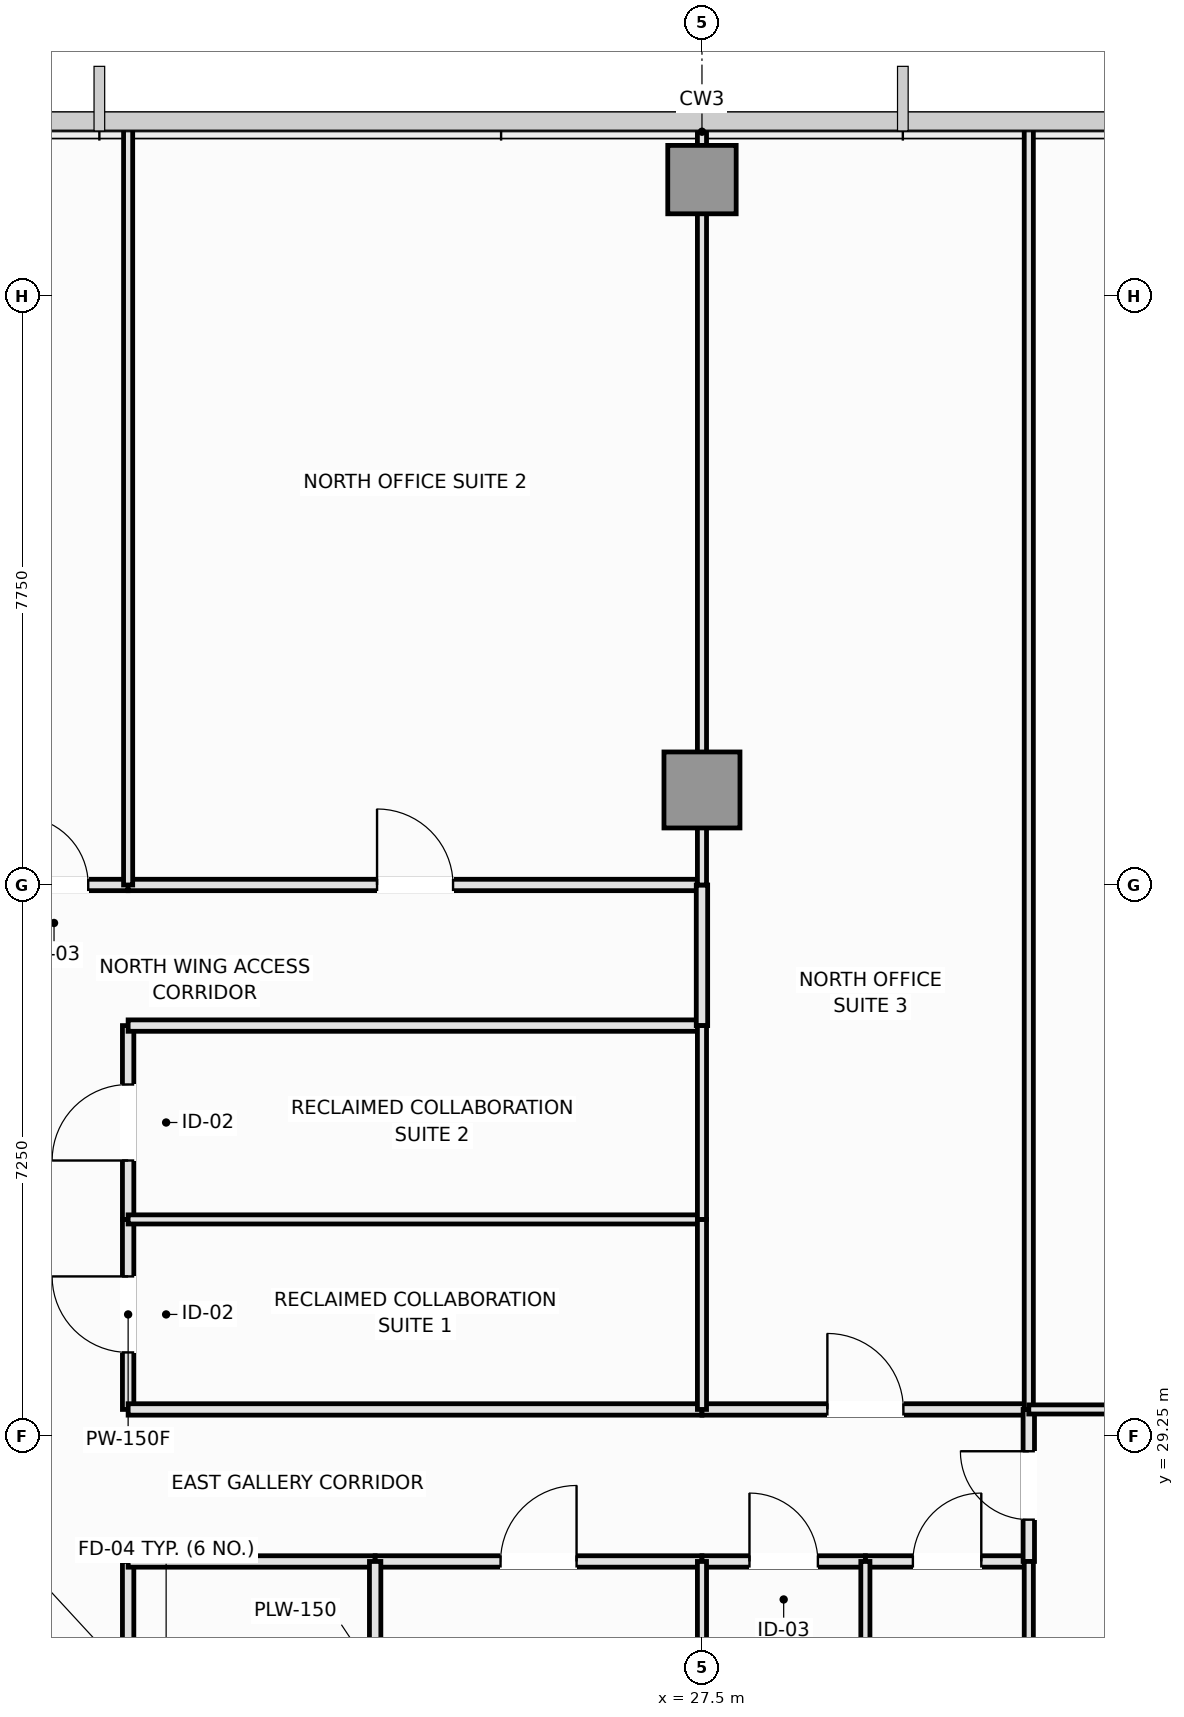
"""IFC4 building model, lengths in metres.
Left out: names, types, materials, properties, quantities, classifications, styles, units other than length and angle.
Written with IfcOpenShell. Run it as: python <this file> out.ifc"""

import sys

from ifc_helpers import new_model, si_unit, direction, frame, frame_2d, origin, origin_2d, place, context, subcontext, project, spatial, rectangle, extrude, element, fill, save


model = new_model("IFC4")
c1 = context("Model", 3, precision=1e-05, world=origin(), true_north=direction((0.0, 1.0)))
c2 = subcontext(c1, "Body", "Model", "MODEL_VIEW")
j1 = project(units=[si_unit("LENGTHUNIT", "METRE"), si_unit("PLANEANGLEUNIT", "RADIAN")], contexts=[c1])
p1 = place(None, origin())
s1 = spatial("IfcSite", under=j1, at=p1, CompositionType="ELEMENT")
p2 = place(p1, origin())
s2 = spatial("IfcBuilding", under=s1, at=p2, CompositionType="ELEMENT")
p3 = place(p2, frame((0.0, 0.0, 159.05)))
s3 = spatial("IfcBuildingStorey", under=s2, at=p3, CompositionType="ELEMENT", Elevation=159.05)
p4 = place(p3, frame((27.5, 37.75, 0.0), z_axis=(0.0, 0.0, 1.0), x_axis=(1.0, 0.0, 0.0)))
e1 = element("IfcColumn", 1, at=p4, inside=s3, PredefinedType="COLUMN", context=c2, shape_type="SweptSolid", body=[
    extrude(rectangle(XDim=1.0, YDim=1.0, at=origin_2d()), origin(), (0.0, 0.0, 1.0), 3.55),
])
p5 = place(p3, frame((27.5, 45.78, 0.0), z_axis=(0.0, 0.0, 1.0), x_axis=(1.0, 0.0, 0.0)))
e2 = element("IfcColumn", 2, at=p5, inside=s3, PredefinedType="COLUMN", context=c2, shape_type="SweptSolid", body=[
    extrude(rectangle(XDim=0.9, YDim=0.9, at=origin_2d()), origin(), (0.0, 0.0, 1.0), 3.55),
])
p6 = place(p3, frame((19.95, 24.6, 0.0), z_axis=(0.0, 0.0, 1.0), x_axis=(0.0, 1.0, 0.0)))
e3 = element("IfcWall", 3, at=p6, inside=s3, PredefinedType="PLUMBINGWALL", context=c2, shape_type="SweptSolid", body=[
    extrude(rectangle(XDim=3.0, YDim=0.15, at=frame_2d((1.5, 0.0))), origin(), (0.0, 0.0, 1.0), 3.37),
])
p7 = place(p6, frame((1.05, 0.0, 0.0)))
e4 = element("IfcOpeningElement", 4, at=p7, cuts=e3, PredefinedType="OPENING", context=c2, shape_type="SweptSolid", body=[
    extrude(rectangle(XDim=0.9, YDim=2.1, at=frame_2d((0.45, 1.05))), frame((0.0, 0.085, 0.0), z_axis=(0.0, -1.0, 0.0), x_axis=(1.0, 0.0, 0.0)), (0.0, 0.0, 1.0), 0.17),
])
p8 = place(p3, frame((19.95, 29.6, 0.0), z_axis=(0.0, 0.0, 1.0), x_axis=(0.0, 1.0, 0.0)))
e5 = element("IfcWall", 5, at=p8, inside=s3, PredefinedType="PARTITIONING", context=c2, shape_type="SweptSolid", body=[
    extrude(rectangle(XDim=2.5, YDim=0.15, at=frame_2d((1.25, 0.0))), origin(), (0.0, 0.0, 1.0), 3.37),
])
p9 = place(p8, frame((0.75, 0.0, 0.0)))
e6 = element("IfcOpeningElement", 6, at=p9, cuts=e5, PredefinedType="OPENING", context=c2, shape_type="SweptSolid", body=[
    extrude(rectangle(XDim=1.0, YDim=2.15, at=frame_2d((0.5, 1.075))), frame((0.0, 0.085, 0.0), z_axis=(0.0, -1.0, 0.0), x_axis=(1.0, 0.0, 0.0)), (0.0, 0.0, 1.0), 0.17),
])
p10 = place(p3, frame((19.95, 32.1, 0.0), z_axis=(0.0, 0.0, 1.0), x_axis=(0.0, 1.0, 0.0)))
e7 = element("IfcWall", 7, at=p10, inside=s3, PredefinedType="PARTITIONING", context=c2, shape_type="SweptSolid", body=[
    extrude(rectangle(XDim=2.55, YDim=0.15, at=frame_2d((1.275, 0.0))), origin(), (0.0, 0.0, 1.0), 3.37),
])
p11 = place(p10, frame((0.775, 0.0, 0.0)))
e8 = element("IfcOpeningElement", 8, at=p11, cuts=e7, PredefinedType="OPENING", context=c2, shape_type="SweptSolid", body=[
    extrude(rectangle(XDim=1.0, YDim=2.15, at=frame_2d((0.5, 1.075))), frame((0.0, 0.085, 0.0), z_axis=(0.0, -1.0, 0.0), x_axis=(1.0, 0.0, 0.0)), (0.0, 0.0, 1.0), 0.17),
])
p12 = place(p3, frame((18.0, 36.5, 0.0), z_axis=(0.0, 0.0, 1.0), x_axis=(1.0, 0.0, 0.0)))
e9 = element("IfcWall", 9, at=p12, inside=s3, PredefinedType="PARTITIONING", context=c2, shape_type="SweptSolid", body=[
    extrude(rectangle(XDim=1.95, YDim=0.15, at=frame_2d((0.975, 0.0))), origin(), (0.0, 0.0, 1.0), 3.37),
])
p13 = place(p12, frame((0.525, 0.0, 0.0)))
e10 = element("IfcOpeningElement", 10, at=p13, cuts=e9, PredefinedType="OPENING", context=c2, shape_type="SweptSolid", body=[
    extrude(rectangle(XDim=0.9, YDim=2.1, at=frame_2d((0.45, 1.05))), frame((0.0, 0.085, 0.0), z_axis=(0.0, -1.0, 0.0), x_axis=(1.0, 0.0, 0.0)), (0.0, 0.0, 1.0), 0.17),
])
p14 = place(p3, frame((19.95, 27.6, 0.0), z_axis=(0.0, 0.0, 1.0), x_axis=(1.0, 0.0, 0.0)))
e11 = element("IfcWall", 11, at=p14, inside=s3, PredefinedType="PLUMBINGWALL", context=c2, shape_type="SweptSolid", body=[
    extrude(rectangle(XDim=3.25, YDim=0.15, at=frame_2d((1.625, 0.0))), origin(), (0.0, 0.0, 1.0), 3.37),
])
p15 = place(p3, frame((23.2, 27.6, 0.0), z_axis=(0.0, 0.0, 1.0), x_axis=(1.0, 0.0, 0.0)))
e12 = element("IfcWall", 12, at=p15, inside=s3, PredefinedType="PARTITIONING", context=c2, shape_type="SweptSolid", body=[
    extrude(rectangle(XDim=4.3, YDim=0.15, at=frame_2d((2.15, 0.0))), origin(), (0.0, 0.0, 1.0), 3.37),
])
p16 = place(p15, frame((1.65, 0.0, 0.0)))
e13 = element("IfcOpeningElement", 13, at=p16, cuts=e12, PredefinedType="OPENING", context=c2, shape_type="SweptSolid", body=[
    extrude(rectangle(XDim=1.0, YDim=2.15, at=frame_2d((0.5, 1.075))), frame((0.0, 0.085, 0.0), z_axis=(0.0, -1.0, 0.0), x_axis=(1.0, 0.0, 0.0)), (0.0, 0.0, 1.0), 0.17),
])
p17 = place(p3, frame((19.95, 29.6, 0.0), z_axis=(0.0, 0.0, 1.0), x_axis=(1.0, 0.0, 0.0)))
e14 = element("IfcWall", 14, at=p17, inside=s3, PredefinedType="PARTITIONING", context=c2, shape_type="SweptSolid", body=[
    extrude(rectangle(XDim=7.55, YDim=0.15, at=frame_2d((3.775, 0.0))), origin(), (0.0, 0.0, 1.0), 3.37),
])
p18 = place(p3, frame((27.5, 27.6, 0.0), z_axis=(0.0, 0.0, 1.0), x_axis=(1.0, 0.0, 0.0)))
e15 = element("IfcWall", 15, at=p18, inside=s3, PredefinedType="PARTITIONING", context=c2, shape_type="SweptSolid", body=[
    extrude(rectangle(XDim=2.15, YDim=0.15, at=frame_2d((1.075, 0.0))), origin(), (0.0, 0.0, 1.0), 3.37),
])
p19 = place(p18, frame((0.625, 0.0, 0.0)))
e16 = element("IfcOpeningElement", 16, at=p19, cuts=e15, PredefinedType="OPENING", context=c2, shape_type="SweptSolid", body=[
    extrude(rectangle(XDim=0.9, YDim=2.1, at=frame_2d((0.45, 1.05))), frame((0.0, 0.085, 0.0), z_axis=(0.0, -1.0, 0.0), x_axis=(1.0, 0.0, 0.0)), (0.0, 0.0, 1.0), 0.17),
])
p20 = place(p3, frame((29.65, 27.6, 0.0), z_axis=(0.0, 0.0, 1.0), x_axis=(1.0, 0.0, 0.0)))
e17 = element("IfcWall", 17, at=p20, inside=s3, PredefinedType="PARTITIONING", context=c2, shape_type="SweptSolid", body=[
    extrude(rectangle(XDim=2.15, YDim=0.15, at=frame_2d((1.075, 0.0))), origin(), (0.0, 0.0, 1.0), 3.37),
])
p21 = place(p20, frame((0.625, 0.0, 0.0)))
e18 = element("IfcOpeningElement", 18, at=p21, cuts=e17, PredefinedType="OPENING", context=c2, shape_type="SweptSolid", body=[
    extrude(rectangle(XDim=0.9, YDim=2.1, at=frame_2d((0.45, 1.05))), frame((0.0, 0.085, 0.0), z_axis=(0.0, -1.0, 0.0), x_axis=(1.0, 0.0, 0.0)), (0.0, 0.0, 1.0), 0.17),
])
p22 = place(p3, frame((27.5, 29.6, 0.0), z_axis=(0.0, 0.0, 1.0), x_axis=(1.0, 0.0, 0.0)))
e19 = element("IfcWall", 19, at=p22, inside=s3, PredefinedType="PARTITIONING", context=c2, shape_type="SweptSolid", body=[
    extrude(rectangle(XDim=4.3, YDim=0.15, at=frame_2d((2.15, 0.0))), origin(), (0.0, 0.0, 1.0), 3.37),
])
p23 = place(p22, frame((1.65, 0.0, 0.0)))
e20 = element("IfcOpeningElement", 20, at=p23, cuts=e19, PredefinedType="OPENING", context=c2, shape_type="SweptSolid", body=[
    extrude(rectangle(XDim=1.0, YDim=2.15, at=frame_2d((0.5, 1.075))), frame((0.0, 0.085, 0.0), z_axis=(0.0, -1.0, 0.0), x_axis=(1.0, 0.0, 0.0)), (0.0, 0.0, 1.0), 0.17),
])
p24 = place(p3, frame((31.8, 27.6, 0.0), z_axis=(0.0, 0.0, 1.0), x_axis=(0.0, 1.0, 0.0)))
e21 = element("IfcWall", 21, at=p24, inside=s3, PredefinedType="PARTITIONING", context=c2, shape_type="SweptSolid", body=[
    extrude(rectangle(XDim=2.0, YDim=0.15, at=frame_2d((1.0, 0.0))), origin(), (0.0, 0.0, 1.0), 3.37),
])
p25 = place(p24, frame((0.55, 0.0, 0.0)))
e22 = element("IfcOpeningElement", 22, at=p25, cuts=e21, PredefinedType="OPENING", context=c2, shape_type="SweptSolid", body=[
    extrude(rectangle(XDim=0.9, YDim=2.1, at=frame_2d((0.45, 1.05))), frame((0.0, 0.085, 0.0), z_axis=(0.0, -1.0, 0.0), x_axis=(1.0, 0.0, 0.0)), (0.0, 0.0, 1.0), 0.17),
])
p26 = place(p3, frame((19.95, 34.65, 0.0), z_axis=(0.0, 0.0, 1.0), x_axis=(1.0, 0.0, 0.0)))
e23 = element("IfcWall", 23, at=p26, inside=s3, PredefinedType="PARTITIONING", context=c2, shape_type="SweptSolid", body=[
    extrude(rectangle(XDim=7.55, YDim=0.15, at=frame_2d((3.775, 0.0))), origin(), (0.0, 0.0, 1.0), 3.37),
])
p27 = place(p3, frame((19.95, 36.5, 0.0), z_axis=(0.0, 0.0, 1.0), x_axis=(1.0, 0.0, 0.0)))
e24 = element("IfcWall", 24, at=p27, inside=s3, PredefinedType="PARTITIONING", context=c2, shape_type="SweptSolid", body=[
    extrude(rectangle(XDim=7.55, YDim=0.15, at=frame_2d((3.775, 0.0))), origin(), (0.0, 0.0, 1.0), 3.37),
])
p28 = place(p27, frame((3.275, 0.0, 0.0)))
e25 = element("IfcOpeningElement", 25, at=p28, cuts=e24, PredefinedType="OPENING", context=c2, shape_type="SweptSolid", body=[
    extrude(rectangle(XDim=1.0, YDim=2.15, at=frame_2d((0.5, 1.075))), frame((0.0, 0.085, 0.0), z_axis=(0.0, -1.0, 0.0), x_axis=(1.0, 0.0, 0.0)), (0.0, 0.0, 1.0), 0.17),
])
p29 = place(p3, frame((27.5, 34.65, 0.0), z_axis=(0.0, 0.0, 1.0), x_axis=(0.0, 1.0, 0.0)))
e26 = element("IfcWall", 26, at=p29, inside=s3, PredefinedType="PARTITIONING", context=c2, shape_type="SweptSolid", body=[
    extrude(rectangle(XDim=1.85, YDim=0.15, at=frame_2d((0.925, 0.0))), origin(), (0.0, 0.0, 1.0), 3.37),
])
p30 = place(p3, frame((23.2, 24.6, 0.0), z_axis=(0.0, 0.0, 1.0), x_axis=(0.0, 1.0, 0.0)))
e27 = element("IfcWall", 27, at=p30, inside=s3, PredefinedType="PLUMBINGWALL", context=c2, shape_type="SweptSolid", body=[
    extrude(rectangle(XDim=3.0, YDim=0.15, at=frame_2d((1.5, 0.0))), origin(), (0.0, 0.0, 1.0), 3.37),
])
p31 = place(p3, frame((27.5, 24.6, 0.0), z_axis=(0.0, 0.0, 1.0), x_axis=(0.0, 1.0, 0.0)))
e28 = element("IfcWall", 28, at=p31, inside=s3, PredefinedType="PARTITIONING", context=c2, shape_type="SweptSolid", body=[
    extrude(rectangle(XDim=3.0, YDim=0.12, at=frame_2d((1.5, 0.0))), origin(), (0.0, 0.0, 1.0), 3.37),
])
p32 = place(p3, frame((19.95, 32.1, 0.0), z_axis=(0.0, 0.0, 1.0), x_axis=(1.0, 0.0, 0.0)))
e29 = element("IfcWall", 29, at=p32, inside=s3, PredefinedType="PARTITIONING", context=c2, shape_type="SweptSolid", body=[
    extrude(rectangle(XDim=7.55, YDim=0.12, at=frame_2d((3.775, 0.0))), origin(), (0.0, 0.0, 1.0), 2.77),
])
p33 = place(p3, frame((27.5, 29.6, 0.0), z_axis=(0.0, 0.0, 1.0), x_axis=(0.0, 1.0, 0.0)))
e30 = element("IfcWall", 30, at=p33, inside=s3, PredefinedType="PARTITIONING", context=c2, shape_type="SweptSolid", body=[
    extrude(rectangle(XDim=2.5, YDim=0.12, at=frame_2d((1.25, 0.0))), origin(), (0.0, 0.0, 1.0), 3.37),
])
p34 = place(p3, frame((27.5, 32.1, 0.0), z_axis=(0.0, 0.0, 1.0), x_axis=(0.0, 1.0, 0.0)))
e31 = element("IfcWall", 31, at=p34, inside=s3, PredefinedType="PARTITIONING", context=c2, shape_type="SweptSolid", body=[
    extrude(rectangle(XDim=2.55, YDim=0.12, at=frame_2d((1.275, 0.0))), origin(), (0.0, 0.0, 1.0), 3.37),
])
for number, where, z_axis, x_axis in (
    (32, (29.65, 3.51, 0.0), (0.0, 0.0, 1.0), (0.0, 1.0, 0.0)),
    (33, (31.8, 3.51, 0.0), (0.0, 0.0, 1.0), (0.0, 1.0, 0.0)),
):
    element("IfcWall", number, at=place(p3, frame(where, z_axis=z_axis, x_axis=x_axis)), inside=s3, PredefinedType="PARTITIONING", context=c2, shape_type="SweptSolid", body=[
        extrude(rectangle(XDim=24.09, YDim=0.12, at=frame_2d((12.045, 0.0))), origin(), (0.0, 0.0, 1.0), 3.37),
    ])
p35 = place(p3, frame((19.95, 36.5, 0.0), z_axis=(0.0, 0.0, 1.0), x_axis=(0.0, 1.0, 0.0)))
e34 = element("IfcWall", 34, at=p35, inside=s3, PredefinedType="PARTITIONING", context=c2, shape_type="SweptSolid", body=[
    extrude(rectangle(XDim=9.99, YDim=0.12, at=frame_2d((4.995, 0.0))), origin(), (0.0, 0.0, 1.0), 3.37),
])
p36 = place(p3, frame((27.5, 36.5, 0.0), z_axis=(0.0, 0.0, 1.0), x_axis=(0.0, 1.0, 0.0)))
e35 = element("IfcWall", 35, at=p36, inside=s3, PredefinedType="PARTITIONING", context=c2, shape_type="SweptSolid", body=[
    extrude(rectangle(XDim=9.99, YDim=0.12, at=frame_2d((4.995, 0.0))), origin(), (0.0, 0.0, 1.0), 2.87),
])
p37 = place(p3, frame((31.8, 29.6, 0.0), z_axis=(0.0, 0.0, 1.0), x_axis=(0.0, 1.0, 0.0)))
e36 = element("IfcWall", 36, at=p37, inside=s3, PredefinedType="PARTITIONING", context=c2, shape_type="SweptSolid", body=[
    extrude(rectangle(XDim=16.89, YDim=0.12, at=frame_2d((8.445, 0.0))), origin(), (0.0, 0.0, 1.0), 3.37),
])
p38 = place(p3, frame((31.8, 29.6, 0.0), z_axis=(0.0, 0.0, 1.0), x_axis=(1.0, 0.0, 0.0)))
e37 = element("IfcWall", 37, at=p38, inside=s3, PredefinedType="PARTITIONING", context=c2, shape_type="SweptSolid", body=[
    extrude(rectangle(XDim=18.69, YDim=0.12, at=frame_2d((9.345, 0.0))), origin(), (0.0, 0.0, 1.0), 3.37),
])
p39 = place(p38, frame((8.845, 0.0, 0.0)))
e38 = element("IfcOpeningElement", 38, at=p39, cuts=e37, PredefinedType="OPENING", context=c2, shape_type="SweptSolid", body=[
    extrude(rectangle(XDim=1.0, YDim=2.15, at=frame_2d((0.5, 1.075))), frame((0.0, 0.07, 0.0), z_axis=(0.0, -1.0, 0.0), x_axis=(1.0, 0.0, 0.0)), (0.0, 0.0, 1.0), 0.14),
])
p40 = place(p9, origin())
e39 = element("IfcDoor", 39, at=p40, inside=s3, OperationType="SINGLE_SWING_RIGHT", PredefinedType="DOOR", context=c2, shape_type="SweptSolid", body=[
    extrude(rectangle(XDim=1.0, YDim=2.15, at=frame_2d((0.5, 1.075))), frame((0.0, 0.025, 0.0), z_axis=(0.0, -1.0, 0.0), x_axis=(1.0, 0.0, 0.0)), (0.0, 0.0, 1.0), 0.05),
])
fill(e6, e39)
p41 = place(p11, origin())
e40 = element("IfcDoor", 40, at=p41, inside=s3, OperationType="SINGLE_SWING_LEFT", PredefinedType="DOOR", context=c2, shape_type="SweptSolid", body=[
    extrude(rectangle(XDim=1.0, YDim=2.15, at=frame_2d((0.5, 1.075))), frame((0.0, 0.025, 0.0), z_axis=(0.0, -1.0, 0.0), x_axis=(1.0, 0.0, 0.0)), (0.0, 0.0, 1.0), 0.05),
])
fill(e8, e40)
p42 = place(p13, origin())
e41 = element("IfcDoor", 41, at=p42, inside=s3, OperationType="SINGLE_SWING_LEFT", PredefinedType="DOOR", context=c2, shape_type="SweptSolid", body=[
    extrude(rectangle(XDim=0.9, YDim=2.1, at=frame_2d((0.45, 1.05))), frame((0.0, 0.025, 0.0), z_axis=(0.0, -1.0, 0.0), x_axis=(1.0, 0.0, 0.0)), (0.0, 0.0, 1.0), 0.05),
])
fill(e10, e41)
p43 = place(p16, origin())
e42 = element("IfcDoor", 42, at=p43, inside=s3, OperationType="SINGLE_SWING_RIGHT", PredefinedType="DOOR", context=c2, shape_type="SweptSolid", body=[
    extrude(rectangle(XDim=1.0, YDim=2.15, at=frame_2d((0.5, 1.075))), frame((0.0, 0.025, 0.0), z_axis=(0.0, -1.0, 0.0), x_axis=(1.0, 0.0, 0.0)), (0.0, 0.0, 1.0), 0.05),
])
fill(e13, e42)
p44 = place(p19, origin())
e43 = element("IfcDoor", 43, at=p44, inside=s3, OperationType="SINGLE_SWING_LEFT", PredefinedType="DOOR", context=c2, shape_type="SweptSolid", body=[
    extrude(rectangle(XDim=0.9, YDim=2.1, at=frame_2d((0.45, 1.05))), frame((0.0, 0.025, 0.0), z_axis=(0.0, -1.0, 0.0), x_axis=(1.0, 0.0, 0.0)), (0.0, 0.0, 1.0), 0.05),
])
fill(e16, e43)
p45 = place(p21, origin())
e44 = element("IfcDoor", 44, at=p45, inside=s3, OperationType="SINGLE_SWING_RIGHT", PredefinedType="DOOR", context=c2, shape_type="SweptSolid", body=[
    extrude(rectangle(XDim=0.9, YDim=2.1, at=frame_2d((0.45, 1.05))), frame((0.0, 0.025, 0.0), z_axis=(0.0, -1.0, 0.0), x_axis=(1.0, 0.0, 0.0)), (0.0, 0.0, 1.0), 0.05),
])
fill(e18, e44)
p46 = place(p23, origin())
e45 = element("IfcDoor", 45, at=p46, inside=s3, OperationType="SINGLE_SWING_LEFT", PredefinedType="DOOR", context=c2, shape_type="SweptSolid", body=[
    extrude(rectangle(XDim=1.0, YDim=2.15, at=frame_2d((0.5, 1.075))), frame((0.0, 0.025, 0.0), z_axis=(0.0, -1.0, 0.0), x_axis=(1.0, 0.0, 0.0)), (0.0, 0.0, 1.0), 0.05),
])
fill(e20, e45)
p47 = place(p25, origin())
e46 = element("IfcDoor", 46, at=p47, inside=s3, OperationType="SINGLE_SWING_RIGHT", PredefinedType="DOOR", context=c2, shape_type="SweptSolid", body=[
    extrude(rectangle(XDim=0.9, YDim=2.1, at=frame_2d((0.45, 1.05))), frame((0.0, 0.025, 0.0), z_axis=(0.0, -1.0, 0.0), x_axis=(1.0, 0.0, 0.0)), (0.0, 0.0, 1.0), 0.05),
])
fill(e22, e46)
p48 = place(p28, origin())
e47 = element("IfcDoor", 47, at=p48, inside=s3, OperationType="SINGLE_SWING_LEFT", PredefinedType="DOOR", context=c2, shape_type="SweptSolid", body=[
    extrude(rectangle(XDim=1.0, YDim=2.15, at=frame_2d((0.5, 1.075))), frame((0.0, 0.025, 0.0), z_axis=(0.0, -1.0, 0.0), x_axis=(1.0, 0.0, 0.0)), (0.0, 0.0, 1.0), 0.05),
])
fill(e25, e47)
save(model, sys.argv[1])
